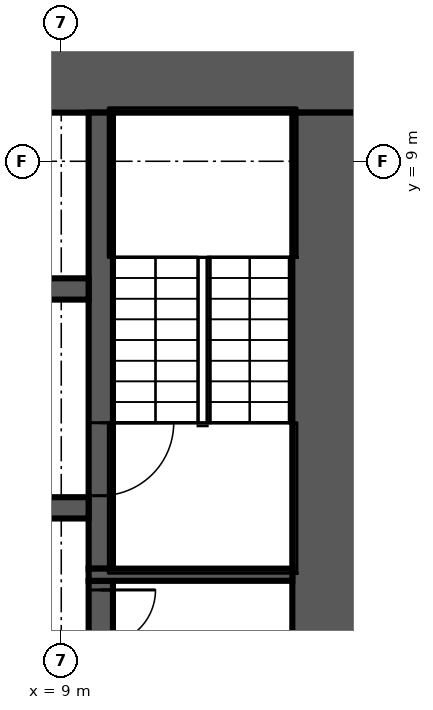
"""IFC4 building model, lengths in metres.
Left out: names, types, materials, properties, quantities, classifications, styles, units other than length and angle.
Written with IfcOpenShell. Run it as: python <this file> out.ifc"""

import sys

from ifc_helpers import new_model, si_unit, direction, frame, frame_2d, origin, place, context, subcontext, project, spatial, rectangle, extrude, element, fill, save


model = new_model("IFC4")
c1 = context("Model", 3, precision=1e-05, world=origin(), true_north=direction((0.0, 1.0)))
c2 = subcontext(c1, "Body", "Model", "MODEL_VIEW")
j1 = project(units=[si_unit("LENGTHUNIT", "METRE"), si_unit("PLANEANGLEUNIT", "RADIAN")], contexts=[c1])
p1 = place(None, origin())
s1 = spatial("IfcSite", under=j1, at=p1, CompositionType="ELEMENT")
p2 = place(p1, origin())
s2 = spatial("IfcBuilding", under=s1, at=p2, CompositionType="ELEMENT")
p3 = place(p2, frame((0.0, 0.0, -6.0)))
s3 = spatial("IfcBuildingStorey", under=s2, at=p3, CompositionType="ELEMENT", Elevation=-6.0)
p4 = place(p3, frame((-14.0, 10.4, 0.0), z_axis=(0.0, 0.0, 1.0), x_axis=(1.0, 0.0, 0.0)))
e1 = element("IfcWall", 1, at=p4, inside=s3, PredefinedType="SHEAR", context=c2, shape_type="SweptSolid", body=[
    extrude(rectangle(XDim=28.0, YDim=1.2, at=frame_2d((14.0, 0.0))), origin(), (0.0, 0.0, 1.0), 5.55),
])
p5 = place(p4, frame((15.9, 0.0, 0.0)))
e2 = element("IfcOpeningElement", 2, at=p5, cuts=e1, PredefinedType="OPENING", context=c2, shape_type="SweptSolid", body=[
    extrude(rectangle(XDim=1.6, YDim=2.1, at=frame_2d((0.8, 1.05))), frame((0.0, 0.61, 0.0), z_axis=(0.0, -1.0, 0.0), x_axis=(1.0, 0.0, 0.0)), (0.0, 0.0, 1.0), 1.22),
])
p6 = place(p3, frame((13.4, 9.8, 0.0), z_axis=(0.0, 0.0, 1.0), x_axis=(0.0, -1.0, 0.0)))
e3 = element("IfcWall", 3, at=p6, inside=s3, PredefinedType="SHEAR", context=c2, shape_type="SweptSolid", body=[
    extrude(rectangle(XDim=19.6, YDim=1.2, at=frame_2d((9.8, 0.0))), origin(), (0.0, 0.0, 1.0), 5.55),
])
p7 = place(p3, frame((9.65, 2.1, 0.0), z_axis=(0.0, 0.0, 1.0), x_axis=(0.0, -1.0, 0.0)))
e4 = element("IfcWall", 4, at=p7, inside=s3, PredefinedType="SHEAR", context=c2, shape_type="SweptSolid", body=[
    extrude(rectangle(XDim=4.2, YDim=0.4, at=frame_2d((2.1, 0.0))), origin(), (0.0, 0.0, 1.0), 5.55),
])
p8 = place(p7, frame((0.15, 0.0, 0.0)))
e5 = element("IfcOpeningElement", 5, at=p8, cuts=e4, PredefinedType="OPENING", context=c2, shape_type="SweptSolid", body=[
    extrude(rectangle(XDim=0.9, YDim=2.1, at=frame_2d((0.45, 1.05))), frame((0.0, 0.21, 0.0), z_axis=(0.0, -1.0, 0.0), x_axis=(1.0, 0.0, 0.0)), (0.0, 0.0, 1.0), 0.42),
])
p9 = place(p3, frame((9.65, 9.8, 0.0), z_axis=(0.0, 0.0, 1.0), x_axis=(0.0, -1.0, 0.0)))
e6 = element("IfcWall", 6, at=p9, inside=s3, PredefinedType="SHEAR", context=c2, shape_type="SweptSolid", body=[
    extrude(rectangle(XDim=7.5, YDim=0.4, at=frame_2d((3.75, 0.0))), origin(), (0.0, 0.0, 1.0), 5.55),
])
p10 = place(p9, frame((5.1, 0.0, 0.0)))
e7 = element("IfcOpeningElement", 7, at=p10, cuts=e6, PredefinedType="OPENING", context=c2, shape_type="SweptSolid", body=[
    extrude(rectangle(XDim=1.2, YDim=2.1, at=frame_2d((0.6, 1.05))), frame((0.0, 0.21, 0.0), z_axis=(0.0, -1.0, 0.0), x_axis=(1.0, 0.0, 0.0)), (0.0, 0.0, 1.0), 0.42),
])
p11 = place(p3, frame((9.45, 2.2, 0.0), z_axis=(0.0, 0.0, 1.0), x_axis=(1.0, 0.0, 0.0)))
e8 = element("IfcWall", 8, at=p11, inside=s3, PredefinedType="SHEAR", context=c2, shape_type="SweptSolid", body=[
    extrude(rectangle(XDim=3.35, YDim=0.2, at=frame_2d((1.675, 0.0))), origin(), (0.0, 0.0, 1.0), 5.55),
])
p12 = place(p3, frame((-9.45, 6.9, 0.0), z_axis=(0.0, 0.0, 1.0), x_axis=(1.0, 0.0, 0.0)))
e9 = element("IfcWall", 9, at=p12, inside=s3, PredefinedType="SHEAR", context=c2, shape_type="SweptSolid", body=[
    extrude(rectangle(XDim=18.9, YDim=0.35, at=frame_2d((9.45, 0.0))), origin(), (0.0, 0.0, 1.0), 5.55),
])
p13 = place(p12, frame((0.8, 0.0, 0.0)))
e10 = element("IfcOpeningElement", 10, at=p13, cuts=e9, PredefinedType="OPENING", context=c2, shape_type="SweptSolid", body=[
    extrude(rectangle(XDim=1.1, YDim=2.1, at=frame_2d((0.55, 1.05))), frame((0.0, 0.185, 0.0), z_axis=(0.0, -1.0, 0.0), x_axis=(1.0, 0.0, 0.0)), (0.0, 0.0, 1.0), 0.37),
])
p14 = place(p12, frame((3.5, 0.0, 0.0)))
e11 = element("IfcOpeningElement", 11, at=p14, cuts=e9, PredefinedType="OPENING", context=c2, shape_type="SweptSolid", body=[
    extrude(rectangle(XDim=1.1, YDim=2.1, at=frame_2d((0.55, 1.05))), frame((0.0, 0.185, 0.0), z_axis=(0.0, -1.0, 0.0), x_axis=(1.0, 0.0, 0.0)), (0.0, 0.0, 1.0), 0.37),
])
p15 = place(p12, frame((6.2, 0.0, 0.0)))
e12 = element("IfcOpeningElement", 12, at=p15, cuts=e9, PredefinedType="OPENING", context=c2, shape_type="SweptSolid", body=[
    extrude(rectangle(XDim=1.1, YDim=2.1, at=frame_2d((0.55, 1.05))), frame((0.0, 0.185, 0.0), z_axis=(0.0, -1.0, 0.0), x_axis=(1.0, 0.0, 0.0)), (0.0, 0.0, 1.0), 0.37),
])
p16 = place(p12, frame((8.9, 0.0, 0.0)))
e13 = element("IfcOpeningElement", 13, at=p16, cuts=e9, PredefinedType="OPENING", context=c2, shape_type="SweptSolid", body=[
    extrude(rectangle(XDim=1.1, YDim=2.1, at=frame_2d((0.55, 1.05))), frame((0.0, 0.185, 0.0), z_axis=(0.0, -1.0, 0.0), x_axis=(1.0, 0.0, 0.0)), (0.0, 0.0, 1.0), 0.37),
])
p17 = place(p12, frame((11.55, 0.0, 0.0)))
e14 = element("IfcOpeningElement", 14, at=p17, cuts=e9, PredefinedType="OPENING", context=c2, shape_type="SweptSolid", body=[
    extrude(rectangle(XDim=1.2, YDim=2.1, at=frame_2d((0.6, 1.05))), frame((0.0, 0.185, 0.0), z_axis=(0.0, -1.0, 0.0), x_axis=(1.0, 0.0, 0.0)), (0.0, 0.0, 1.0), 0.37),
])
p18 = place(p12, frame((14.3, 0.0, 0.0)))
e15 = element("IfcOpeningElement", 15, at=p18, cuts=e9, PredefinedType="OPENING", context=c2, shape_type="SweptSolid", body=[
    extrude(rectangle(XDim=1.1, YDim=2.1, at=frame_2d((0.55, 1.05))), frame((0.0, 0.185, 0.0), z_axis=(0.0, -1.0, 0.0), x_axis=(1.0, 0.0, 0.0)), (0.0, 0.0, 1.0), 0.37),
])
p19 = place(p12, frame((17.0, 0.0, 0.0)))
e16 = element("IfcOpeningElement", 16, at=p19, cuts=e9, PredefinedType="OPENING", context=c2, shape_type="SweptSolid", body=[
    extrude(rectangle(XDim=1.1, YDim=2.1, at=frame_2d((0.55, 1.05))), frame((0.0, 0.185, 0.0), z_axis=(0.0, -1.0, 0.0), x_axis=(1.0, 0.0, 0.0)), (0.0, 0.0, 1.0), 0.37),
])
p20 = place(p3, frame((9.45, 3.3, 0.0), z_axis=(0.0, 0.0, 1.0), x_axis=(-1.0, 0.0, 0.0)))
e17 = element("IfcWall", 17, at=p20, inside=s3, PredefinedType="SHEAR", context=c2, shape_type="SweptSolid", body=[
    extrude(rectangle(XDim=18.9, YDim=0.35, at=frame_2d((9.45, 0.0))), origin(), (0.0, 0.0, 1.0), 5.55),
])
p21 = place(p20, frame((17.0, 0.0, 0.0)))
e18 = element("IfcOpeningElement", 18, at=p21, cuts=e17, PredefinedType="OPENING", context=c2, shape_type="SweptSolid", body=[
    extrude(rectangle(XDim=1.1, YDim=2.1, at=frame_2d((0.55, 1.05))), frame((0.0, 0.185, 0.0), z_axis=(0.0, -1.0, 0.0), x_axis=(1.0, 0.0, 0.0)), (0.0, 0.0, 1.0), 0.37),
])
p22 = place(p20, frame((14.3, 0.0, 0.0)))
e19 = element("IfcOpeningElement", 19, at=p22, cuts=e17, PredefinedType="OPENING", context=c2, shape_type="SweptSolid", body=[
    extrude(rectangle(XDim=1.1, YDim=2.1, at=frame_2d((0.55, 1.05))), frame((0.0, 0.185, 0.0), z_axis=(0.0, -1.0, 0.0), x_axis=(1.0, 0.0, 0.0)), (0.0, 0.0, 1.0), 0.37),
])
p23 = place(p20, frame((11.6, 0.0, 0.0)))
e20 = element("IfcOpeningElement", 20, at=p23, cuts=e17, PredefinedType="OPENING", context=c2, shape_type="SweptSolid", body=[
    extrude(rectangle(XDim=1.1, YDim=2.1, at=frame_2d((0.55, 1.05))), frame((0.0, 0.185, 0.0), z_axis=(0.0, -1.0, 0.0), x_axis=(1.0, 0.0, 0.0)), (0.0, 0.0, 1.0), 0.37),
])
p24 = place(p20, frame((8.9, 0.0, 0.0)))
e21 = element("IfcOpeningElement", 21, at=p24, cuts=e17, PredefinedType="OPENING", context=c2, shape_type="SweptSolid", body=[
    extrude(rectangle(XDim=1.1, YDim=2.1, at=frame_2d((0.55, 1.05))), frame((0.0, 0.185, 0.0), z_axis=(0.0, -1.0, 0.0), x_axis=(1.0, 0.0, 0.0)), (0.0, 0.0, 1.0), 0.37),
])
p25 = place(p20, frame((6.2, 0.0, 0.0)))
e22 = element("IfcOpeningElement", 22, at=p25, cuts=e17, PredefinedType="OPENING", context=c2, shape_type="SweptSolid", body=[
    extrude(rectangle(XDim=1.1, YDim=2.1, at=frame_2d((0.55, 1.05))), frame((0.0, 0.185, 0.0), z_axis=(0.0, -1.0, 0.0), x_axis=(1.0, 0.0, 0.0)), (0.0, 0.0, 1.0), 0.37),
])
p26 = place(p20, frame((3.5, 0.0, 0.0)))
e23 = element("IfcOpeningElement", 23, at=p26, cuts=e17, PredefinedType="OPENING", context=c2, shape_type="SweptSolid", body=[
    extrude(rectangle(XDim=1.1, YDim=2.1, at=frame_2d((0.55, 1.05))), frame((0.0, 0.185, 0.0), z_axis=(0.0, -1.0, 0.0), x_axis=(1.0, 0.0, 0.0)), (0.0, 0.0, 1.0), 0.37),
])
p27 = place(p20, frame((0.9, 0.0, 0.0)))
e24 = element("IfcOpeningElement", 24, at=p27, cuts=e17, PredefinedType="OPENING", context=c2, shape_type="SweptSolid", body=[
    extrude(rectangle(XDim=0.9, YDim=2.1, at=frame_2d((0.45, 1.05))), frame((0.0, 0.185, 0.0), z_axis=(0.0, -1.0, 0.0), x_axis=(1.0, 0.0, 0.0)), (0.0, 0.0, 1.0), 0.37),
])
p28 = place(p8, origin())
e25 = element("IfcDoor", 25, at=p28, inside=s3, OperationType="SINGLE_SWING_RIGHT", PredefinedType="DOOR", context=c2, shape_type="SweptSolid", body=[
    extrude(rectangle(XDim=0.9, YDim=2.1, at=frame_2d((0.45, 1.05))), frame((0.0, 0.025, 0.0), z_axis=(0.0, -1.0, 0.0), x_axis=(1.0, 0.0, 0.0)), (0.0, 0.0, 1.0), 0.05),
])
fill(e5, e25)
p29 = place(p10, origin())
e26 = element("IfcDoor", 26, at=p29, inside=s3, OperationType="SINGLE_SWING_LEFT", PredefinedType="DOOR", context=c2, shape_type="SweptSolid", body=[
    extrude(rectangle(XDim=1.2, YDim=2.1, at=frame_2d((0.6, 1.05))), frame((0.0, 0.025, 0.0), z_axis=(0.0, -1.0, 0.0), x_axis=(1.0, 0.0, 0.0)), (0.0, 0.0, 1.0), 0.05),
])
fill(e7, e26)
save(model, sys.argv[1])
